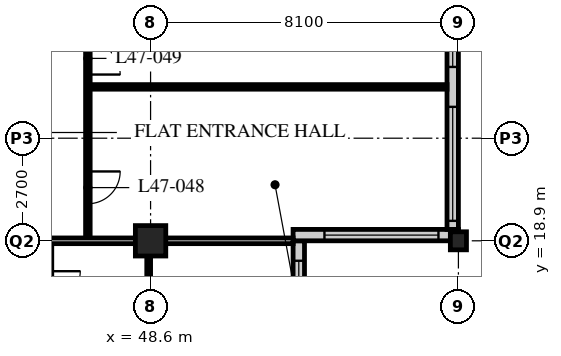
"""IFC4 building model, lengths in metres.
Left out: names, types, materials, properties, quantities, classifications, styles, units other than length and angle.
Written with IfcOpenShell. Run it as: python <this file> out.ifc"""

import sys

from ifc_helpers import new_model, si_unit, direction, frame, frame_2d, origin, origin_2d, place, context, subcontext, project, spatial, rectangle, hollow_rectangle, i_section, extrude, element, fill, save


model = new_model("IFC4")
c1 = context("Model", 3, precision=1e-05, world=origin(), true_north=direction((0.0, 1.0)))
c2 = subcontext(c1, "Body", "Model", "MODEL_VIEW")
j1 = project(units=[si_unit("LENGTHUNIT", "METRE"), si_unit("PLANEANGLEUNIT", "RADIAN")], contexts=[c1])
p1 = place(None, origin())
s1 = spatial("IfcSite", under=j1, at=p1, CompositionType="ELEMENT")
p2 = place(p1, origin())
s2 = spatial("IfcBuilding", under=s1, at=p2, CompositionType="ELEMENT")
p3 = place(p2, frame((0.0, 0.0, 184.8)))
s3 = spatial("IfcBuildingStorey", under=s2, at=p3, CompositionType="ELEMENT", Elevation=184.8)
p4 = place(p3, frame((48.6, 18.9, 0.0), z_axis=(0.0, 0.0, 1.0), x_axis=(1.0, 0.0, 0.0)))
e1 = element("IfcColumn", 1, at=p4, inside=s3, PredefinedType="COLUMN", context=c2, shape_type="SweptSolid", body=[
    extrude(hollow_rectangle(XDim=0.8, YDim=0.8, WallThickness=0.08, at=origin_2d()), origin(), (0.0, 0.0, 1.0), 3.6),
])
p5 = place(p3, frame((56.7, 18.9, 0.0), z_axis=(0.0, 0.0, 1.0), x_axis=(1.0, 0.0, 0.0)))
e2 = element("IfcColumn", 2, at=p5, inside=s3, PredefinedType="COLUMN", context=c2, shape_type="SweptSolid", body=[
    extrude(i_section(OverallWidth=0.424, OverallDepth=0.475, WebThickness=0.048, FlangeThickness=0.077, FilletRadius=0.015, at=origin_2d()), origin(), (0.0, 0.0, 1.0), 3.6),
])
p6 = place(p3, frame((52.5, 15.15, 0.0), z_axis=(0.0, 0.0, 1.0), x_axis=(0.0, 1.0, 0.0)))
e3 = element("IfcWall", 3, at=p6, inside=s3, PredefinedType="SOLIDWALL", context=c2, shape_type="SweptSolid", body=[
    extrude(rectangle(XDim=3.75, YDim=0.3, at=frame_2d((1.875, 0.0))), origin(), (0.0, 0.0, 1.0), 3.39),
])
p7 = place(p6, frame((0.225, 0.0, 0.6)))
e4 = element("IfcOpeningElement", 4, at=p7, cuts=e3, PredefinedType="OPENING", context=c2, shape_type="SweptSolid", body=[
    extrude(rectangle(XDim=3.0, YDim=2.0, at=frame_2d((1.5, 1.0))), frame((0.0, 0.16, 0.0), z_axis=(0.0, -1.0, 0.0), x_axis=(1.0, 0.0, 0.0)), (0.0, 0.0, 1.0), 0.32),
])
p8 = place(p3, frame((52.35, 19.05, 0.0), z_axis=(0.0, 0.0, 1.0), x_axis=(1.0, 0.0, 0.0)))
e5 = element("IfcWall", 5, at=p8, inside=s3, PredefinedType="SOLIDWALL", context=c2, shape_type="SweptSolid", body=[
    extrude(rectangle(XDim=4.35, YDim=0.3, at=frame_2d((2.175, 0.0))), origin(), (0.0, 0.0, 1.0), 3.39),
])
p9 = place(p8, frame((0.825, 0.0, 0.6)))
e6 = element("IfcOpeningElement", 6, at=p9, cuts=e5, PredefinedType="OPENING", context=c2, shape_type="SweptSolid", body=[
    extrude(rectangle(XDim=3.0, YDim=2.0, at=frame_2d((1.5, 1.0))), frame((0.0, 0.16, 0.0), z_axis=(0.0, -1.0, 0.0), x_axis=(1.0, 0.0, 0.0)), (0.0, 0.0, 1.0), 0.32),
])
p10 = place(p3, frame((56.55, 19.2, 0.0), z_axis=(0.0, 0.0, 1.0), x_axis=(0.0, 1.0, 0.0)))
e7 = element("IfcWall", 7, at=p10, inside=s3, PredefinedType="SOLIDWALL", context=c2, shape_type="SweptSolid", body=[
    extrude(rectangle(XDim=32.1, YDim=0.3, at=frame_2d((16.05, 0.0))), origin(), (0.0, 0.0, 1.0), 3.39),
])
p11 = place(p10, frame((0.225, 0.0, 0.6)))
e8 = element("IfcOpeningElement", 8, at=p11, cuts=e7, PredefinedType="OPENING", context=c2, shape_type="SweptSolid", body=[
    extrude(rectangle(XDim=3.0, YDim=2.4, at=frame_2d((1.5, 1.2))), frame((0.0, 0.16, 0.0), z_axis=(0.0, -1.0, 0.0), x_axis=(1.0, 0.0, 0.0)), (0.0, 0.0, 1.0), 0.32),
])
p12 = place(p10, frame((4.275, 0.0, 0.6)))
e9 = element("IfcOpeningElement", 9, at=p12, cuts=e7, PredefinedType="OPENING", context=c2, shape_type="SweptSolid", body=[
    extrude(rectangle(XDim=3.0, YDim=2.4, at=frame_2d((1.5, 1.2))), frame((0.0, 0.16, 0.0), z_axis=(0.0, -1.0, 0.0), x_axis=(1.0, 0.0, 0.0)), (0.0, 0.0, 1.0), 0.32),
])
p13 = place(p10, frame((8.325, 0.0, 0.6)))
e10 = element("IfcOpeningElement", 10, at=p13, cuts=e7, PredefinedType="OPENING", context=c2, shape_type="SweptSolid", body=[
    extrude(rectangle(XDim=3.0, YDim=2.4, at=frame_2d((1.5, 1.2))), frame((0.0, 0.16, 0.0), z_axis=(0.0, -1.0, 0.0), x_axis=(1.0, 0.0, 0.0)), (0.0, 0.0, 1.0), 0.32),
])
p14 = place(p10, frame((12.375, 0.0, 0.6)))
e11 = element("IfcOpeningElement", 11, at=p14, cuts=e7, PredefinedType="OPENING", context=c2, shape_type="SweptSolid", body=[
    extrude(rectangle(XDim=3.0, YDim=2.4, at=frame_2d((1.5, 1.2))), frame((0.0, 0.16, 0.0), z_axis=(0.0, -1.0, 0.0), x_axis=(1.0, 0.0, 0.0)), (0.0, 0.0, 1.0), 0.32),
])
p15 = place(p10, frame((16.425, 0.0, 0.6)))
e12 = element("IfcOpeningElement", 12, at=p15, cuts=e7, PredefinedType="OPENING", context=c2, shape_type="SweptSolid", body=[
    extrude(rectangle(XDim=3.0, YDim=2.4, at=frame_2d((1.5, 1.2))), frame((0.0, 0.16, 0.0), z_axis=(0.0, -1.0, 0.0), x_axis=(1.0, 0.0, 0.0)), (0.0, 0.0, 1.0), 0.32),
])
p16 = place(p10, frame((20.475, 0.0, 0.6)))
e13 = element("IfcOpeningElement", 13, at=p16, cuts=e7, PredefinedType="OPENING", context=c2, shape_type="SweptSolid", body=[
    extrude(rectangle(XDim=3.0, YDim=2.4, at=frame_2d((1.5, 1.2))), frame((0.0, 0.16, 0.0), z_axis=(0.0, -1.0, 0.0), x_axis=(1.0, 0.0, 0.0)), (0.0, 0.0, 1.0), 0.32),
])
p17 = place(p10, frame((24.525, 0.0, 0.6)))
e14 = element("IfcOpeningElement", 14, at=p17, cuts=e7, PredefinedType="OPENING", context=c2, shape_type="SweptSolid", body=[
    extrude(rectangle(XDim=3.0, YDim=2.4, at=frame_2d((1.5, 1.2))), frame((0.0, 0.16, 0.0), z_axis=(0.0, -1.0, 0.0), x_axis=(1.0, 0.0, 0.0)), (0.0, 0.0, 1.0), 0.32),
])
p18 = place(p10, frame((28.575, 0.0, 0.6)))
e15 = element("IfcOpeningElement", 15, at=p18, cuts=e7, PredefinedType="OPENING", context=c2, shape_type="SweptSolid", body=[
    extrude(rectangle(XDim=3.0, YDim=2.4, at=frame_2d((1.5, 1.2))), frame((0.0, 0.16, 0.0), z_axis=(0.0, -1.0, 0.0), x_axis=(1.0, 0.0, 0.0)), (0.0, 0.0, 1.0), 0.32),
])
p19 = place(p3, frame((46.95, 18.9, 0.0), z_axis=(0.0, 0.0, 1.0), x_axis=(0.0, 1.0, 0.0)))
e16 = element("IfcWall", 16, at=p19, inside=s3, PredefinedType="PARTITIONING", context=c2, shape_type="SweptSolid", body=[
    extrude(rectangle(XDim=8.1, YDim=0.12, at=frame_2d((4.05, 0.0))), origin(), (0.0, 0.0, 1.0), 3.39),
])
p20 = place(p19, frame((0.975, 0.0, 0.0)))
e17 = element("IfcOpeningElement", 17, at=p20, cuts=e16, PredefinedType="OPENING", context=c2, shape_type="SweptSolid", body=[
    extrude(rectangle(XDim=0.85, YDim=2.1, at=frame_2d((0.425, 1.05))), frame((0.0, 0.07, 0.0), z_axis=(0.0, -1.0, 0.0), x_axis=(1.0, 0.0, 0.0)), (0.0, 0.0, 1.0), 0.14),
])
p21 = place(p19, frame((4.375, 0.0, 0.0)))
e18 = element("IfcOpeningElement", 18, at=p21, cuts=e16, PredefinedType="OPENING", context=c2, shape_type="SweptSolid", body=[
    extrude(rectangle(XDim=0.85, YDim=2.1, at=frame_2d((0.425, 1.05))), frame((0.0, 0.07, 0.0), z_axis=(0.0, -1.0, 0.0), x_axis=(1.0, 0.0, 0.0)), (0.0, 0.0, 1.0), 0.14),
])
p22 = place(p3, frame((46.95, 22.95, 0.0), z_axis=(0.0, 0.0, 1.0), x_axis=(1.0, 0.0, 0.0)))
e19 = element("IfcWall", 19, at=p22, inside=s3, PredefinedType="PARTITIONING", context=c2, shape_type="SweptSolid", body=[
    extrude(rectangle(XDim=9.45, YDim=0.12, at=frame_2d((4.725, 0.0))), origin(), (0.0, 0.0, 1.0), 3.39),
])
p23 = place(p3, frame((48.55, 18.9, 0.0), z_axis=(0.0, 0.0, 1.0), x_axis=(0.0, -1.0, 0.0)))
e20 = element("IfcWall", 20, at=p23, inside=s3, PredefinedType="PARTITIONING", context=c2, shape_type="SweptSolid", body=[
    extrude(rectangle(XDim=2.4, YDim=0.1, at=frame_2d((1.2, 0.0))), origin(), (0.0, 0.0, 1.0), 2.778),
])
p24 = place(p3, frame((44.55, 18.9, 0.0), z_axis=(0.0, 0.0, 1.0), x_axis=(1.0, 0.0, 0.0)))
e21 = element("IfcWall", 21, at=p24, inside=s3, PredefinedType="PARTITIONING", context=c2, shape_type="SweptSolid", body=[
    extrude(rectangle(XDim=7.8, YDim=0.15, at=frame_2d((3.9, 0.0))), origin(), (0.0, 0.0, 1.0), 2.778),
])
p25 = place(p7, origin())
e22 = element("IfcWindow", 22, at=p25, inside=s3, PartitioningType="SINGLE_PANEL", PredefinedType="WINDOW", context=c2, shape_type="SweptSolid", body=[
    extrude(rectangle(XDim=3.0, YDim=2.0, at=frame_2d((1.5, 1.0))), frame((0.0, 0.03, 0.0), z_axis=(0.0, -1.0, 0.0), x_axis=(1.0, 0.0, 0.0)), (0.0, 0.0, 1.0), 0.06),
])
fill(e4, e22)
p26 = place(p9, origin())
e23 = element("IfcWindow", 23, at=p26, inside=s3, PartitioningType="SINGLE_PANEL", PredefinedType="WINDOW", context=c2, shape_type="SweptSolid", body=[
    extrude(rectangle(XDim=3.0, YDim=2.0, at=frame_2d((1.5, 1.0))), frame((0.0, 0.03, 0.0), z_axis=(0.0, -1.0, 0.0), x_axis=(1.0, 0.0, 0.0)), (0.0, 0.0, 1.0), 0.06),
])
fill(e6, e23)
p27 = place(p11, origin())
e24 = element("IfcWindow", 24, at=p27, inside=s3, PartitioningType="SINGLE_PANEL", PredefinedType="WINDOW", context=c2, shape_type="SweptSolid", body=[
    extrude(rectangle(XDim=3.0, YDim=2.4, at=frame_2d((1.5, 1.2))), frame((0.0, 0.03, 0.0), z_axis=(0.0, -1.0, 0.0), x_axis=(1.0, 0.0, 0.0)), (0.0, 0.0, 1.0), 0.06),
])
fill(e8, e24)
p28 = place(p12, origin())
e25 = element("IfcWindow", 25, at=p28, inside=s3, PartitioningType="SINGLE_PANEL", PredefinedType="WINDOW", context=c2, shape_type="SweptSolid", body=[
    extrude(rectangle(XDim=3.0, YDim=2.4, at=frame_2d((1.5, 1.2))), frame((0.0, 0.03, 0.0), z_axis=(0.0, -1.0, 0.0), x_axis=(1.0, 0.0, 0.0)), (0.0, 0.0, 1.0), 0.06),
])
fill(e9, e25)
p29 = place(p20, origin())
e26 = element("IfcDoor", 26, at=p29, inside=s3, OperationType="SINGLE_SWING_LEFT", PredefinedType="DOOR", context=c2, shape_type="SweptSolid", body=[
    extrude(rectangle(XDim=0.85, YDim=2.1, at=frame_2d((0.425, 1.05))), frame((0.0, 0.025, 0.0), z_axis=(0.0, -1.0, 0.0), x_axis=(1.0, 0.0, 0.0)), (0.0, 0.0, 1.0), 0.05),
])
fill(e17, e26)
p30 = place(p21, origin())
e27 = element("IfcDoor", 27, at=p30, inside=s3, OperationType="SINGLE_SWING_RIGHT", PredefinedType="DOOR", context=c2, shape_type="SweptSolid", body=[
    extrude(rectangle(XDim=0.85, YDim=2.1, at=frame_2d((0.425, 1.05))), frame((0.0, 0.025, 0.0), z_axis=(0.0, -1.0, 0.0), x_axis=(1.0, 0.0, 0.0)), (0.0, 0.0, 1.0), 0.05),
])
fill(e18, e27)
save(model, sys.argv[1])
